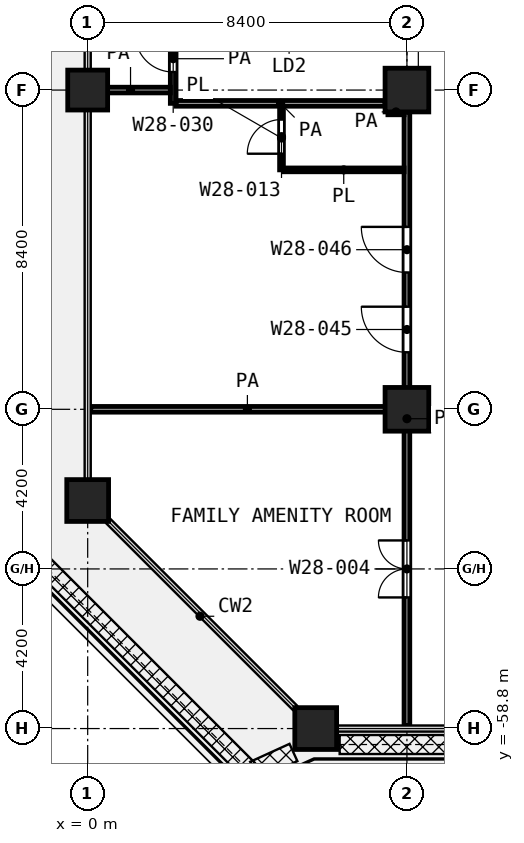
"""IFC4 building model, lengths in metres.
Left out: names, types, materials, properties, quantities, classifications, styles, units other than length and angle.
Written with IfcOpenShell. Run it as: python <this file> out.ifc"""

import sys

from ifc_helpers import new_model, si_unit, direction, frame, frame_2d, origin, origin_2d, place, context, subcontext, project, spatial, rectangle, extrude, element, fill, save


model = new_model("IFC4")
c1 = context("Model", 3, precision=1e-05, world=origin(), true_north=direction((0.0, 1.0)))
c2 = subcontext(c1, "Body", "Model", "MODEL_VIEW")
j1 = project(units=[si_unit("LENGTHUNIT", "METRE"), si_unit("PLANEANGLEUNIT", "RADIAN")], contexts=[c1])
p1 = place(None, origin())
s1 = spatial("IfcSite", under=j1, at=p1, CompositionType="ELEMENT")
p2 = place(p1, origin())
s2 = spatial("IfcBuilding", under=s1, at=p2, CompositionType="ELEMENT")
p3 = place(p2, frame((0.0, 0.0, 145.0)))
s3 = spatial("IfcBuildingStorey", under=s2, at=p3, CompositionType="ELEMENT", Elevation=145.0)
p4 = place(p3, frame((0.0, -42.0, 0.0), z_axis=(0.0, 0.0, 1.0), x_axis=(1.0, 0.0, 0.0)))
e1 = element("IfcColumn", 1, at=p4, inside=s3, PredefinedType="COLUMN", context=c2, shape_type="SweptSolid", body=[
    extrude(rectangle(XDim=1.05, YDim=1.05, at=origin_2d()), origin(), (0.0, 0.0, 1.0), 4.2),
])
for number, where, z_axis, x_axis in (
    (2, (8.4, -42.0, 0.0), (0.0, 0.0, 1.0), (1.0, 0.0, 0.0)),
    (3, (8.4, -50.4, 0.0), (0.0, 0.0, 1.0), (1.0, 0.0, 0.0)),
):
    element("IfcColumn", number, at=place(p3, frame(where, z_axis=z_axis, x_axis=x_axis)), inside=s3, PredefinedType="COLUMN", context=c2, shape_type="SweptSolid", body=[
        extrude(rectangle(XDim=1.15, YDim=1.15, at=origin_2d()), origin(), (0.0, 0.0, 1.0), 4.2),
    ])
for number, where, z_axis, x_axis in (
    (4, (0.0, -52.8, 0.0), (0.0, 0.0, 1.0), (1.0, 0.0, 0.0)),
    (5, (6.0, -58.8, 0.0), (0.0, 0.0, 1.0), (1.0, 0.0, 0.0)),
):
    element("IfcColumn", number, at=place(p3, frame(where, z_axis=z_axis, x_axis=x_axis)), inside=s3, PredefinedType="COLUMN", context=c2, shape_type="SweptSolid", body=[
        extrude(rectangle(XDim=1.1, YDim=1.1, at=origin_2d()), origin(), (0.0, 0.0, 1.0), 4.2),
    ])
p5 = place(p3, frame((5.15, -44.1, 0.0), z_axis=(0.0, 0.0, 1.0), x_axis=(1.0, 0.0, 0.0)))
e6 = element("IfcWall", 6, at=p5, inside=s3, PredefinedType="PARTITIONING", context=c2, shape_type="SweptSolid", body=[
    extrude(rectangle(XDim=3.175, YDim=0.1, at=frame_2d((1.587, 0.0))), origin(), (0.0, 0.0, 1.0), 3.6),
])
p6 = place(p3, frame((5.1, -44.1, 0.0), z_axis=(0.0, 0.0, 1.0), x_axis=(0.0, 1.0, 0.0)))
e7 = element("IfcWall", 7, at=p6, inside=s3, PredefinedType="PARTITIONING", context=c2, shape_type="SweptSolid", body=[
    extrude(rectangle(XDim=1.675, YDim=0.1, at=frame_2d((0.837, 0.0))), origin(), (0.0, 0.0, 1.0), 3.6),
])
p7 = place(p6, frame((0.425, 0.0, 0.0)))
e8 = element("IfcOpeningElement", 8, at=p7, cuts=e7, PredefinedType="OPENING", context=c2, shape_type="SweptSolid", body=[
    extrude(rectangle(XDim=0.9, YDim=2.1, at=frame_2d((0.45, 1.05))), frame((0.0, 0.06, 0.0), z_axis=(0.0, -1.0, 0.0), x_axis=(1.0, 0.0, 0.0)), (0.0, 0.0, 1.0), 0.12),
])
p8 = place(p3, frame((0.08, -50.4, 0.0), z_axis=(0.0, 0.0, 1.0), x_axis=(1.0, 0.0, 0.0)))
e9 = element("IfcWall", 9, at=p8, inside=s3, PredefinedType="PARTITIONING", context=c2, shape_type="SweptSolid", body=[
    extrude(rectangle(XDim=8.245, YDim=0.15, at=frame_2d((4.123, 0.0))), origin(), (0.0, 0.0, 1.0), 3.6),
])
p9 = place(p3, frame((7.9, -42.575, 0.0), z_axis=(0.0, 0.0, 1.0), x_axis=(1.0, 0.0, 0.0)))
e10 = element("IfcWall", 10, at=p9, inside=s3, PredefinedType="PARTITIONING", context=c2, shape_type="SweptSolid", body=[
    extrude(rectangle(XDim=0.425, YDim=0.15, at=frame_2d((0.212, 0.0))), origin(), (0.0, 0.0, 1.0), 3.6),
])
p10 = place(p3, frame((2.325, -42.35, 0.0), z_axis=(0.0, 0.0, 1.0), x_axis=(1.0, 0.0, 0.0)))
e11 = element("IfcWall", 11, at=p10, inside=s3, PredefinedType="PARTITIONING", context=c2, shape_type="SweptSolid", body=[
    extrude(rectangle(XDim=5.498, YDim=0.15, at=frame_2d((2.749, 0.0))), origin(), (0.0, 0.0, 1.0), 3.6),
])
p11 = place(p3, frame((0.08, -42.0, 0.0), z_axis=(0.0, 0.0, 1.0), x_axis=(1.0, 0.0, 0.0)))
e12 = element("IfcWall", 12, at=p11, inside=s3, PredefinedType="PARTITIONING", context=c2, shape_type="SweptSolid", body=[
    extrude(rectangle(XDim=2.095, YDim=0.15, at=frame_2d((1.047, 0.0))), origin(), (0.0, 0.0, 1.0), 3.6),
])
p12 = place(p3, frame((2.25, -42.35, 0.0), z_axis=(0.0, 0.0, 1.0), x_axis=(0.0, 1.0, 0.0)))
e13 = element("IfcWall", 13, at=p12, inside=s3, PredefinedType="PARTITIONING", context=c2, shape_type="SweptSolid", body=[
    extrude(rectangle(XDim=2.35, YDim=0.15, at=frame_2d((1.175, 0.0))), origin(), (0.0, 0.0, 1.0), 3.6),
])
p13 = place(p12, frame((0.825, 0.0, 0.0)))
e14 = element("IfcOpeningElement", 14, at=p13, cuts=e13, PredefinedType="OPENING", context=c2, shape_type="SweptSolid", body=[
    extrude(rectangle(XDim=1.0, YDim=2.1, at=frame_2d((0.5, 1.05))), frame((0.0, 0.085, 0.0), z_axis=(0.0, -1.0, 0.0), x_axis=(1.0, 0.0, 0.0)), (0.0, 0.0, 1.0), 0.17),
])
p14 = place(p3, frame((8.4, -58.72, 0.0), z_axis=(0.0, 0.0, 1.0), x_axis=(0.0, 1.0, 0.0)))
e15 = element("IfcWall", 15, at=p14, inside=s3, PredefinedType="PARTITIONING", context=c2, shape_type="SweptSolid", body=[
    extrude(rectangle(XDim=16.145, YDim=0.15, at=frame_2d((8.073, 0.0))), origin(), (0.0, 0.0, 1.0), 2.7),
])
p15 = place(p14, frame((9.82, 0.0, 0.0)))
e16 = element("IfcOpeningElement", 16, at=p15, cuts=e15, PredefinedType="OPENING", context=c2, shape_type="SweptSolid", body=[
    extrude(rectangle(XDim=1.2, YDim=2.1, at=frame_2d((0.6, 1.05))), frame((0.0, 0.085, 0.0), z_axis=(0.0, -1.0, 0.0), x_axis=(1.0, 0.0, 0.0)), (0.0, 0.0, 1.0), 0.17),
])
p16 = place(p14, frame((11.92, 0.0, 0.0)))
e17 = element("IfcOpeningElement", 17, at=p16, cuts=e15, PredefinedType="OPENING", context=c2, shape_type="SweptSolid", body=[
    extrude(rectangle(XDim=1.2, YDim=2.1, at=frame_2d((0.6, 1.05))), frame((0.0, 0.085, 0.0), z_axis=(0.0, -1.0, 0.0), x_axis=(1.0, 0.0, 0.0)), (0.0, 0.0, 1.0), 0.17),
])
p17 = place(p14, frame((3.37, 0.0, 0.0)))
e18 = element("IfcOpeningElement", 18, at=p17, cuts=e15, PredefinedType="OPENING", context=c2, shape_type="SweptSolid", body=[
    extrude(rectangle(XDim=1.5, YDim=2.1, at=frame_2d((0.75, 1.05))), frame((0.0, 0.085, 0.0), z_axis=(0.0, -1.0, 0.0), x_axis=(1.0, 0.0, 0.0)), (0.0, 0.0, 1.0), 0.17),
])
p18 = place(p13, origin())
e19 = element("IfcDoor", 19, at=p18, inside=s3, OperationType="SINGLE_SWING_RIGHT", PredefinedType="DOOR", context=c2, shape_type="SweptSolid", body=[
    extrude(rectangle(XDim=1.0, YDim=2.1, at=frame_2d((0.5, 1.05))), frame((0.0, 0.025, 0.0), z_axis=(0.0, -1.0, 0.0), x_axis=(1.0, 0.0, 0.0)), (0.0, 0.0, 1.0), 0.05),
])
fill(e14, e19)
p19 = place(p15, origin())
e20 = element("IfcDoor", 20, at=p19, inside=s3, OperationType="SINGLE_SWING_RIGHT", PredefinedType="DOOR", context=c2, shape_type="SweptSolid", body=[
    extrude(rectangle(XDim=1.2, YDim=2.1, at=frame_2d((0.6, 1.05))), frame((0.0, 0.025, 0.0), z_axis=(0.0, -1.0, 0.0), x_axis=(1.0, 0.0, 0.0)), (0.0, 0.0, 1.0), 0.05),
])
fill(e16, e20)
p20 = place(p16, origin())
e21 = element("IfcDoor", 21, at=p20, inside=s3, OperationType="SINGLE_SWING_RIGHT", PredefinedType="DOOR", context=c2, shape_type="SweptSolid", body=[
    extrude(rectangle(XDim=1.2, YDim=2.1, at=frame_2d((0.6, 1.05))), frame((0.0, 0.025, 0.0), z_axis=(0.0, -1.0, 0.0), x_axis=(1.0, 0.0, 0.0)), (0.0, 0.0, 1.0), 0.05),
])
fill(e17, e21)
p21 = place(p7, origin())
e22 = element("IfcDoor", 22, at=p21, inside=s3, OperationType="SINGLE_SWING_LEFT", PredefinedType="DOOR", context=c2, shape_type="SweptSolid", body=[
    extrude(rectangle(XDim=0.9, YDim=2.1, at=frame_2d((0.45, 1.05))), frame((0.0, 0.025, 0.0), z_axis=(0.0, -1.0, 0.0), x_axis=(1.0, 0.0, 0.0)), (0.0, 0.0, 1.0), 0.05),
])
fill(e8, e22)
p22 = place(p17, origin())
e23 = element("IfcDoor", 23, at=p22, inside=s3, OperationType="DOUBLE_DOOR_SINGLE_SWING", PredefinedType="DOOR", context=c2, shape_type="SweptSolid", body=[
    extrude(rectangle(XDim=1.5, YDim=2.1, at=frame_2d((0.75, 1.05))), frame((0.0, 0.025, 0.0), z_axis=(0.0, -1.0, 0.0), x_axis=(1.0, 0.0, 0.0)), (0.0, 0.0, 1.0), 0.05),
])
fill(e18, e23)
save(model, sys.argv[1])
